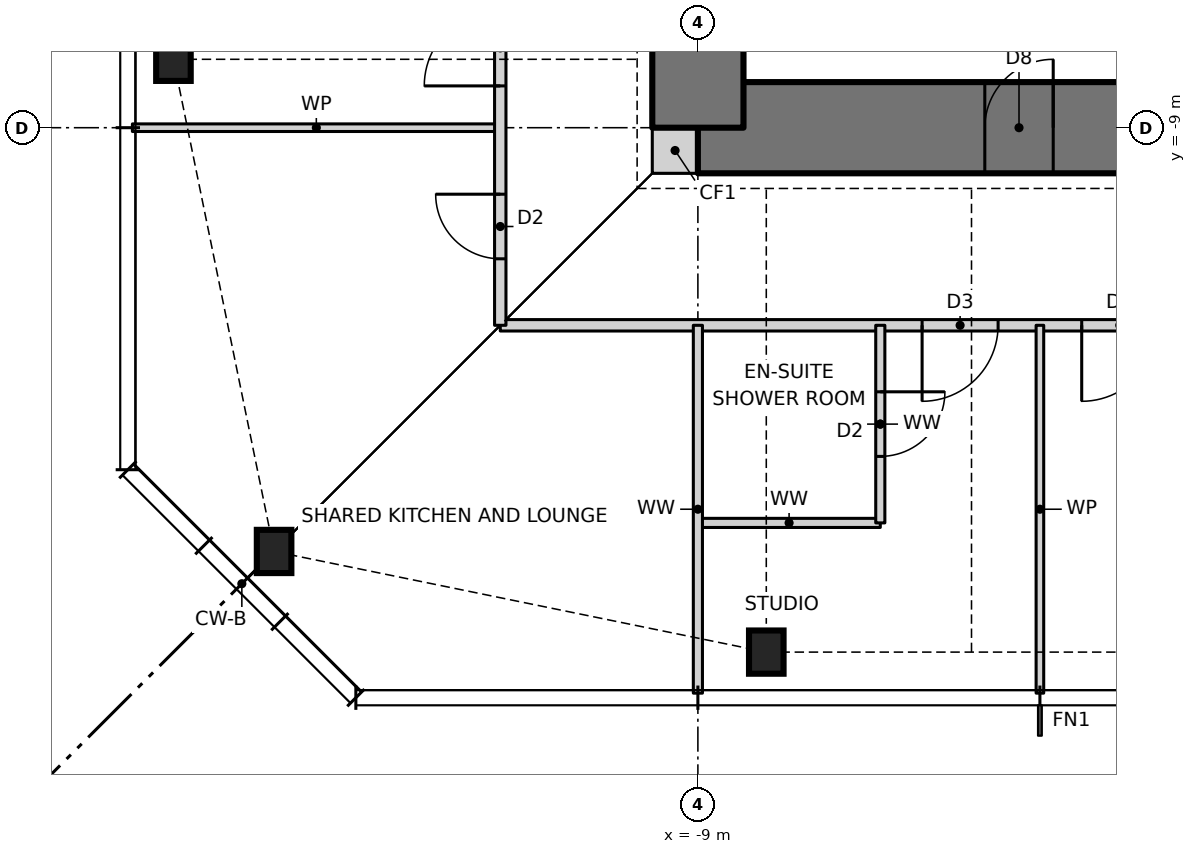
"""IFC4 building model, lengths in metres.
Left out: names, types, materials, properties, quantities, classifications, styles, units other than length and angle.
Written with IfcOpenShell. Run it as: python <this file> out.ifc"""

import sys

from ifc_helpers import new_model, si_unit, direction, frame, frame_2d, origin, origin_2d, place, context, subcontext, project, spatial, rectangle, i_section, extrude, element, fill, save


model = new_model("IFC4")
c1 = context("Model", 3, precision=1e-05, world=origin(), true_north=direction((0.0, 1.0)))
c2 = subcontext(c1, "Body", "Model", "MODEL_VIEW")
j1 = project(units=[si_unit("LENGTHUNIT", "METRE"), si_unit("PLANEANGLEUNIT", "RADIAN")], contexts=[c1])
p1 = place(None, origin())
s1 = spatial("IfcSite", under=j1, at=p1, CompositionType="ELEMENT")
p2 = place(p1, origin())
s2 = spatial("IfcBuilding", under=s1, at=p2, CompositionType="ELEMENT")
p3 = place(p2, frame((0.0, 0.0, 222.0)))
s3 = spatial("IfcBuildingStorey", under=s2, at=p3, CompositionType="ELEMENT", Elevation=222.0)
for number, where, z_axis, x_axis in (
    (1, (-14.576, -14.576, 0.0), (0.0, 0.0, 1.0), (1.0, 0.0, 0.0)),
    (2, (-8.1, -15.9, 0.0), (0.0, 0.0, 1.0), (1.0, 0.0, 0.0)),
    (3, (-15.9, -8.1, 0.0), (0.0, 0.0, 1.0), (1.0, 0.0, 0.0)),
):
    element("IfcColumn", number, at=place(p3, frame(where, z_axis=z_axis, x_axis=x_axis)), inside=s3, PredefinedType="COLUMN", context=c2, shape_type="SweptSolid", body=[
        extrude(i_section(OverallWidth=0.455, OverallDepth=0.569, WebThickness=0.078, FlangeThickness=0.125, at=origin_2d()), origin(), (0.0, 0.0, 1.0), 3.5),
    ])
p4 = place(p3, frame((-9.6, -9.3, 0.0), z_axis=(0.0, 0.0, 1.0), x_axis=(1.0, 0.0, 0.0)))
e4 = element("IfcWall", 4, at=p4, inside=s3, PredefinedType="SOLIDWALL", context=c2, shape_type="SweptSolid", body=[
    extrude(rectangle(XDim=0.6, YDim=0.6, at=frame_2d((0.3, 0.0))), origin(), (0.0, 0.0, 1.0), 3.5),
])
p5 = place(p3, frame((-9.0, -9.0, 0.0), z_axis=(0.0, 0.0, 1.0), x_axis=(1.0, 0.0, 0.0)))
e5 = element("IfcWall", 5, at=p5, inside=s3, PredefinedType="SHEAR", context=c2, shape_type="SweptSolid", body=[
    extrude(rectangle(XDim=18.0, YDim=1.2, at=frame_2d((9.0, 0.0))), origin(), (0.0, 0.0, 1.0), 3.5),
])
p6 = place(p5, frame((3.775, 0.0, 0.0)))
e6 = element("IfcOpeningElement", 6, at=p6, cuts=e5, PredefinedType="OPENING", context=c2, shape_type="SweptSolid", body=[
    extrude(rectangle(XDim=0.9, YDim=2.1, at=frame_2d((0.45, 1.05))), frame((0.0, 0.61, 0.0), z_axis=(0.0, -1.0, 0.0), x_axis=(1.0, 0.0, 0.0)), (0.0, 0.0, 1.0), 1.22),
])
p7 = place(p5, frame((10.625, 0.0, 0.0)))
e7 = element("IfcOpeningElement", 7, at=p7, cuts=e5, PredefinedType="OPENING", context=c2, shape_type="SweptSolid", body=[
    extrude(rectangle(XDim=0.9, YDim=2.1, at=frame_2d((0.45, 1.05))), frame((0.0, 0.61, 0.0), z_axis=(0.0, -1.0, 0.0), x_axis=(1.0, 0.0, 0.0)), (0.0, 0.0, 1.0), 1.22),
])
p8 = place(p3, frame((-9.0, 9.0, 0.0), z_axis=(0.0, 0.0, 1.0), x_axis=(0.0, -1.0, 0.0)))
e8 = element("IfcWall", 8, at=p8, inside=s3, PredefinedType="SHEAR", context=c2, shape_type="SweptSolid", body=[
    extrude(rectangle(XDim=18.0, YDim=1.2, at=frame_2d((9.0, 0.0))), origin(), (0.0, 0.0, 1.0), 3.5),
])
p9 = place(p8, frame((8.5, 0.0, 0.0)))
e9 = element("IfcOpeningElement", 9, at=p9, cuts=e8, PredefinedType="OPENING", context=c2, shape_type="SweptSolid", body=[
    extrude(rectangle(XDim=1.0, YDim=2.1, at=frame_2d((0.5, 1.05))), frame((0.0, 0.61, 0.0), z_axis=(0.0, -1.0, 0.0), x_axis=(1.0, 0.0, 0.0)), (0.0, 0.0, 1.0), 1.22),
])
p10 = place(p3, frame((-9.0, -14.2, 0.0), z_axis=(0.0, 0.0, 1.0), x_axis=(1.0, 0.0, 0.0)))
e10 = element("IfcWall", 10, at=p10, inside=s3, PredefinedType="PARTITIONING", context=c2, shape_type="SweptSolid", body=[
    extrude(rectangle(XDim=2.4, YDim=0.12, at=frame_2d((1.2, 0.0))), origin(), (0.0, 0.0, 1.0), 3.27),
])
p11 = place(p3, frame((-11.6, -11.6, 0.0), z_axis=(0.0, 0.0, 1.0), x_axis=(1.0, 0.0, 0.0)))
e11 = element("IfcWall", 11, at=p11, inside=s3, PredefinedType="PARTITIONING", context=c2, shape_type="SweptSolid", body=[
    extrude(rectangle(XDim=23.2, YDim=0.15, at=frame_2d((11.6, 0.0))), origin(), (0.0, 0.0, 1.0), 3.27),
])
p12 = place(p11, frame((5.55, 0.0, 0.0)))
e12 = element("IfcOpeningElement", 12, at=p12, cuts=e11, PredefinedType="OPENING", context=c2, shape_type="SweptSolid", body=[
    extrude(rectangle(XDim=1.0, YDim=2.1, at=frame_2d((0.5, 1.05))), frame((0.0, 0.085, 0.0), z_axis=(0.0, -1.0, 0.0), x_axis=(1.0, 0.0, 0.0)), (0.0, 0.0, 1.0), 0.17),
])
p13 = place(p11, frame((7.65, 0.0, 0.0)))
e13 = element("IfcOpeningElement", 13, at=p13, cuts=e11, PredefinedType="OPENING", context=c2, shape_type="SweptSolid", body=[
    extrude(rectangle(XDim=1.0, YDim=2.1, at=frame_2d((0.5, 1.05))), frame((0.0, 0.085, 0.0), z_axis=(0.0, -1.0, 0.0), x_axis=(1.0, 0.0, 0.0)), (0.0, 0.0, 1.0), 0.17),
])
p14 = place(p11, frame((14.55, 0.0, 0.0)))
e14 = element("IfcOpeningElement", 14, at=p14, cuts=e11, PredefinedType="OPENING", context=c2, shape_type="SweptSolid", body=[
    extrude(rectangle(XDim=1.0, YDim=2.1, at=frame_2d((0.5, 1.05))), frame((0.0, 0.085, 0.0), z_axis=(0.0, -1.0, 0.0), x_axis=(1.0, 0.0, 0.0)), (0.0, 0.0, 1.0), 0.17),
])
p15 = place(p11, frame((16.65, 0.0, 0.0)))
e15 = element("IfcOpeningElement", 15, at=p15, cuts=e11, PredefinedType="OPENING", context=c2, shape_type="SweptSolid", body=[
    extrude(rectangle(XDim=1.0, YDim=2.1, at=frame_2d((0.5, 1.05))), frame((0.0, 0.085, 0.0), z_axis=(0.0, -1.0, 0.0), x_axis=(1.0, 0.0, 0.0)), (0.0, 0.0, 1.0), 0.17),
])
p16 = place(p11, frame((21.0, 0.0, 0.0)))
e16 = element("IfcOpeningElement", 16, at=p16, cuts=e11, PredefinedType="OPENING", context=c2, shape_type="SweptSolid", body=[
    extrude(rectangle(XDim=1.8, YDim=2.1, at=frame_2d((0.9, 1.05))), frame((0.0, 0.085, 0.0), z_axis=(0.0, -1.0, 0.0), x_axis=(1.0, 0.0, 0.0)), (0.0, 0.0, 1.0), 0.17),
])
for number, where, z_axis, x_axis in (
    (17, (-16.44, -9.0, 0.0), (0.0, 0.0, 1.0), (1.0, 0.0, 0.0)),
    (18, (-4.5, -16.44, 0.0), (0.0, 0.0, 1.0), (0.0, 1.0, 0.0)),
):
    element("IfcWall", number, at=place(p3, frame(where, z_axis=z_axis, x_axis=x_axis)), inside=s3, PredefinedType="PARTITIONING", context=c2, shape_type="SweptSolid", body=[
        extrude(rectangle(XDim=4.84, YDim=0.1, at=frame_2d((2.42, 0.0))), origin(), (0.0, 0.0, 1.0), 3.27),
    ])
p17 = place(p3, frame((-6.6, -14.2, 0.0), z_axis=(0.0, 0.0, 1.0), x_axis=(0.0, 1.0, 0.0)))
e19 = element("IfcWall", 19, at=p17, inside=s3, PredefinedType="PARTITIONING", context=c2, shape_type="SweptSolid", body=[
    extrude(rectangle(XDim=2.6, YDim=0.12, at=frame_2d((1.3, 0.0))), origin(), (0.0, 0.0, 1.0), 3.27),
])
p18 = place(p17, frame((0.875, 0.0, 0.0)))
e20 = element("IfcOpeningElement", 20, at=p18, cuts=e19, PredefinedType="OPENING", context=c2, shape_type="SweptSolid", body=[
    extrude(rectangle(XDim=0.85, YDim=2.1, at=frame_2d((0.425, 1.05))), frame((0.0, 0.07, 0.0), z_axis=(0.0, -1.0, 0.0), x_axis=(1.0, 0.0, 0.0)), (0.0, 0.0, 1.0), 0.14),
])
p19 = place(p3, frame((-9.0, -16.44, 0.0), z_axis=(0.0, 0.0, 1.0), x_axis=(0.0, 1.0, 0.0)))
e21 = element("IfcWall", 21, at=p19, inside=s3, PredefinedType="PARTITIONING", context=c2, shape_type="SweptSolid", body=[
    extrude(rectangle(XDim=4.84, YDim=0.12, at=frame_2d((2.42, 0.0))), origin(), (0.0, 0.0, 1.0), 3.27),
])
p20 = place(p3, frame((-11.6, -11.6, 0.0), z_axis=(0.0, 0.0, 1.0), x_axis=(0.0, 1.0, 0.0)))
e22 = element("IfcWall", 22, at=p20, inside=s3, PredefinedType="PARTITIONING", context=c2, shape_type="SweptSolid", body=[
    extrude(rectangle(XDim=23.2, YDim=0.15, at=frame_2d((11.6, 0.0))), origin(), (0.0, 0.0, 1.0), 3.27),
])
p21 = place(p20, frame((16.5, 0.0, 0.0)))
e23 = element("IfcOpeningElement", 23, at=p21, cuts=e22, PredefinedType="OPENING", context=c2, shape_type="SweptSolid", body=[
    extrude(rectangle(XDim=1.0, YDim=2.1, at=frame_2d((0.5, 1.05))), frame((0.0, 0.085, 0.0), z_axis=(0.0, -1.0, 0.0), x_axis=(1.0, 0.0, 0.0)), (0.0, 0.0, 1.0), 0.17),
])
p22 = place(p20, frame((10.05, 0.0, 0.0)))
e24 = element("IfcOpeningElement", 24, at=p22, cuts=e22, PredefinedType="OPENING", context=c2, shape_type="SweptSolid", body=[
    extrude(rectangle(XDim=1.0, YDim=2.1, at=frame_2d((0.5, 1.05))), frame((0.0, 0.085, 0.0), z_axis=(0.0, -1.0, 0.0), x_axis=(1.0, 0.0, 0.0)), (0.0, 0.0, 1.0), 0.17),
])
p23 = place(p20, frame((3.15, 0.0, 0.0)))
e25 = element("IfcOpeningElement", 25, at=p23, cuts=e22, PredefinedType="OPENING", context=c2, shape_type="SweptSolid", body=[
    extrude(rectangle(XDim=1.0, YDim=2.1, at=frame_2d((0.5, 1.05))), frame((0.0, 0.085, 0.0), z_axis=(0.0, -1.0, 0.0), x_axis=(1.0, 0.0, 0.0)), (0.0, 0.0, 1.0), 0.17),
])
p24 = place(p20, frame((0.875, 0.0, 0.0)))
e26 = element("IfcOpeningElement", 26, at=p24, cuts=e22, PredefinedType="OPENING", context=c2, shape_type="SweptSolid", body=[
    extrude(rectangle(XDim=0.85, YDim=2.1, at=frame_2d((0.425, 1.05))), frame((0.0, 0.085, 0.0), z_axis=(0.0, -1.0, 0.0), x_axis=(1.0, 0.0, 0.0)), (0.0, 0.0, 1.0), 0.17),
])
p25 = place(p12, frame((1.0, 0.0, 0.0), z_axis=(0.0, 0.0, 1.0), x_axis=(-1.0, 0.0, 0.0)))
e27 = element("IfcDoor", 27, at=p25, inside=s3, OperationType="SINGLE_SWING_RIGHT", PredefinedType="DOOR", context=c2, shape_type="SweptSolid", body=[
    extrude(rectangle(XDim=1.0, YDim=2.1, at=frame_2d((0.5, 1.05))), frame((0.0, 0.025, 0.0), z_axis=(0.0, -1.0, 0.0), x_axis=(1.0, 0.0, 0.0)), (0.0, 0.0, 1.0), 0.05),
])
fill(e12, e27)
p26 = place(p18, frame((0.85, 0.0, 0.0), z_axis=(0.0, 0.0, 1.0), x_axis=(-1.0, 0.0, 0.0)))
e28 = element("IfcDoor", 28, at=p26, inside=s3, OperationType="SINGLE_SWING_LEFT", PredefinedType="DOOR", context=c2, shape_type="SweptSolid", body=[
    extrude(rectangle(XDim=0.85, YDim=2.1, at=frame_2d((0.425, 1.05))), frame((0.0, 0.025, 0.0), z_axis=(0.0, -1.0, 0.0), x_axis=(1.0, 0.0, 0.0)), (0.0, 0.0, 1.0), 0.05),
])
fill(e20, e28)
p27 = place(p13, frame((1.0, 0.0, 0.0), z_axis=(0.0, 0.0, 1.0), x_axis=(-1.0, 0.0, 0.0)))
e29 = element("IfcDoor", 29, at=p27, inside=s3, OperationType="SINGLE_SWING_RIGHT", PredefinedType="DOOR", context=c2, shape_type="SweptSolid", body=[
    extrude(rectangle(XDim=1.0, YDim=2.1, at=frame_2d((0.5, 1.05))), frame((0.0, 0.025, 0.0), z_axis=(0.0, -1.0, 0.0), x_axis=(1.0, 0.0, 0.0)), (0.0, 0.0, 1.0), 0.05),
])
fill(e13, e29)
p28 = place(p23, origin())
e30 = element("IfcDoor", 30, at=p28, inside=s3, OperationType="SINGLE_SWING_LEFT", PredefinedType="DOOR", context=c2, shape_type="SweptSolid", body=[
    extrude(rectangle(XDim=1.0, YDim=2.1, at=frame_2d((0.5, 1.05))), frame((0.0, 0.025, 0.0), z_axis=(0.0, -1.0, 0.0), x_axis=(1.0, 0.0, 0.0)), (0.0, 0.0, 1.0), 0.05),
])
fill(e25, e30)
p29 = place(p24, origin())
e31 = element("IfcDoor", 31, at=p29, inside=s3, OperationType="SINGLE_SWING_RIGHT", PredefinedType="DOOR", context=c2, shape_type="SweptSolid", body=[
    extrude(rectangle(XDim=0.85, YDim=2.1, at=frame_2d((0.425, 1.05))), frame((0.0, 0.025, 0.0), z_axis=(0.0, -1.0, 0.0), x_axis=(1.0, 0.0, 0.0)), (0.0, 0.0, 1.0), 0.05),
])
fill(e26, e31)
p30 = place(p6, origin())
e32 = element("IfcDoor", 32, at=p30, inside=s3, OperationType="SINGLE_SWING_RIGHT", PredefinedType="DOOR", context=c2, shape_type="SweptSolid", body=[
    extrude(rectangle(XDim=0.9, YDim=2.1, at=frame_2d((0.45, 1.05))), frame((0.0, 0.025, 0.0), z_axis=(0.0, -1.0, 0.0), x_axis=(1.0, 0.0, 0.0)), (0.0, 0.0, 1.0), 0.05),
])
fill(e6, e32)
save(model, sys.argv[1])
